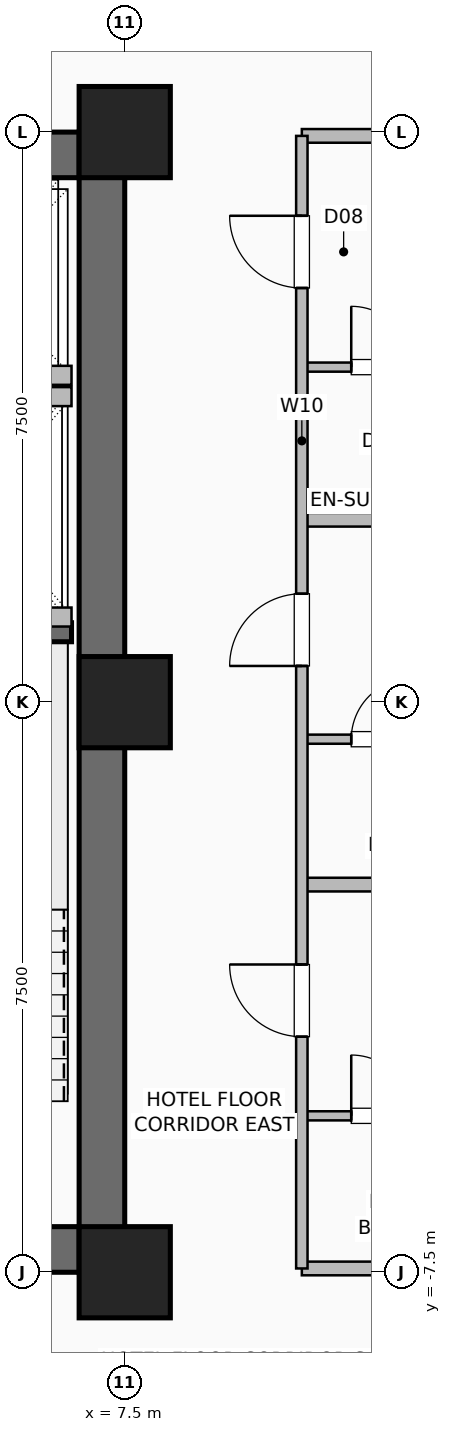
"""IFC4 building model, lengths in metres.
Left out: names, types, materials, properties, quantities, classifications, styles, units other than length and angle.
Written with IfcOpenShell. Run it as: python <this file> out.ifc"""

import sys

from ifc_helpers import new_model, si_unit, direction, frame, frame_2d, origin, origin_2d, place, context, subcontext, project, spatial, rectangle, hollow_rectangle, extrude, element, fill, save


model = new_model("IFC4")
c1 = context("Model", 3, precision=1e-05, world=origin(), true_north=direction((0.0, 1.0)))
c2 = subcontext(c1, "Body", "Model", "MODEL_VIEW")
j1 = project(units=[si_unit("LENGTHUNIT", "METRE"), si_unit("PLANEANGLEUNIT", "RADIAN")], contexts=[c1])
p1 = place(None, origin())
s1 = spatial("IfcSite", under=j1, at=p1, CompositionType="ELEMENT")
p2 = place(p1, origin())
s2 = spatial("IfcBuilding", under=s1, at=p2, CompositionType="ELEMENT")
p3 = place(p2, frame((0.0, 0.0, 69.0)))
s3 = spatial("IfcBuildingStorey", under=s2, at=p3, CompositionType="ELEMENT", Elevation=69.0)
for number, where, z_axis, x_axis in (
    (1, (7.5, -7.5, 0.0), (0.0, 0.0, 1.0), (1.0, 0.0, 0.0)),
    (2, (7.5, 0.0, 0.0), (0.0, 0.0, 1.0), (1.0, 0.0, 0.0)),
    (3, (7.5, 7.5, 0.0), (0.0, 0.0, 1.0), (1.0, 0.0, 0.0)),
):
    element("IfcColumn", number, at=place(p3, frame(where, z_axis=z_axis, x_axis=x_axis)), inside=s3, PredefinedType="COLUMN", context=c2, shape_type="SweptSolid", body=[
        extrude(hollow_rectangle(XDim=1.2, YDim=1.2, WallThickness=0.055, at=origin_2d()), origin(), (0.0, 0.0, 1.0), 3.5),
    ])
p4 = place(p3, frame((-7.5, -7.2, 0.0), z_axis=(0.0, 0.0, 1.0), x_axis=(1.0, 0.0, 0.0)))
e4 = element("IfcWall", 4, at=p4, inside=s3, PredefinedType="SHEAR", context=c2, shape_type="SweptSolid", body=[
    extrude(rectangle(XDim=15.0, YDim=0.6, at=frame_2d((7.5, 0.0))), origin(), (0.0, 0.0, 1.0), 3.25),
])
p5 = place(p4, frame((1.55, 0.0, 0.0)))
e5 = element("IfcOpeningElement", 5, at=p5, cuts=e4, PredefinedType="OPENING", context=c2, shape_type="SweptSolid", body=[
    extrude(rectangle(XDim=1.05, YDim=2.08, at=frame_2d((0.525, 1.04))), frame((0.0, 0.31, 0.0), z_axis=(0.0, -1.0, 0.0), x_axis=(1.0, 0.0, 0.0)), (0.0, 0.0, 1.0), 0.62),
])
p6 = place(p4, frame((12.4, 0.0, 0.0)))
e6 = element("IfcOpeningElement", 6, at=p6, cuts=e4, PredefinedType="OPENING", context=c2, shape_type="SweptSolid", body=[
    extrude(rectangle(XDim=1.05, YDim=2.08, at=frame_2d((0.525, 1.04))), frame((0.0, 0.31, 0.0), z_axis=(0.0, -1.0, 0.0), x_axis=(1.0, 0.0, 0.0)), (0.0, 0.0, 1.0), 0.62),
])
p7 = place(p4, frame((4.64, 0.0, 0.0)))
e7 = element("IfcOpeningElement", 7, at=p7, cuts=e4, PredefinedType="OPENING", context=c2, shape_type="SweptSolid", body=[
    extrude(rectangle(XDim=1.1, YDim=2.2, at=frame_2d((0.55, 1.1))), frame((0.0, 0.31, 0.0), z_axis=(0.0, -1.0, 0.0), x_axis=(1.0, 0.0, 0.0)), (0.0, 0.0, 1.0), 0.62),
])
p8 = place(p4, frame((6.52, 0.0, 0.0)))
e8 = element("IfcOpeningElement", 8, at=p8, cuts=e4, PredefinedType="OPENING", context=c2, shape_type="SweptSolid", body=[
    extrude(rectangle(XDim=1.1, YDim=2.2, at=frame_2d((0.55, 1.1))), frame((0.0, 0.31, 0.0), z_axis=(0.0, -1.0, 0.0), x_axis=(1.0, 0.0, 0.0)), (0.0, 0.0, 1.0), 0.62),
])
p9 = place(p4, frame((8.4, 0.0, 0.0)))
e9 = element("IfcOpeningElement", 9, at=p9, cuts=e4, PredefinedType="OPENING", context=c2, shape_type="SweptSolid", body=[
    extrude(rectangle(XDim=1.1, YDim=2.2, at=frame_2d((0.55, 1.1))), frame((0.0, 0.31, 0.0), z_axis=(0.0, -1.0, 0.0), x_axis=(1.0, 0.0, 0.0)), (0.0, 0.0, 1.0), 0.62),
])
for number, where, z_axis, x_axis in (
    (10, (-7.5, 7.2, 0.0), (0.0, 0.0, 1.0), (1.0, 0.0, 0.0)),
    (11, (7.2, -7.5, 0.0), (0.0, 0.0, 1.0), (0.0, 1.0, 0.0)),
):
    element("IfcWall", number, at=place(p3, frame(where, z_axis=z_axis, x_axis=x_axis)), inside=s3, PredefinedType="SHEAR", context=c2, shape_type="SweptSolid", body=[
        extrude(rectangle(XDim=15.0, YDim=0.6, at=frame_2d((7.5, 0.0))), origin(), (0.0, 0.0, 1.0), 3.25),
    ])
p10 = place(p3, frame((3.47, 0.92, 0.0), z_axis=(0.0, 0.0, 1.0), x_axis=(1.0, 0.0, 0.0)))
e12 = element("IfcWall", 12, at=p10, inside=s3, PredefinedType="SHEAR", context=c2, shape_type="SweptSolid", body=[
    extrude(rectangle(XDim=3.33, YDim=0.25, at=frame_2d((1.665, 0.0))), origin(), (0.0, 0.0, 1.0), 3.25),
])
p11 = place(p3, frame((4.38, 4.3, 0.0), z_axis=(0.0, 0.0, 1.0), x_axis=(1.0, 0.0, 0.0)))
e13 = element("IfcWall", 13, at=p11, inside=s3, PredefinedType="SHEAR", context=c2, shape_type="SweptSolid", body=[
    extrude(rectangle(XDim=2.42, YDim=0.25, at=frame_2d((1.21, 0.0))), origin(), (0.0, 0.0, 1.0), 3.25),
])
for number, where, z_axis, x_axis in (
    (14, (4.28, 1.12, 0.0), (0.0, 0.0, 1.0), (1.0, 0.0, 0.0)),
    (15, (4.28, 4.02, 0.0), (0.0, 0.0, 1.0), (1.0, 0.0, 0.0)),
):
    element("IfcWall", number, at=place(p3, frame(where, z_axis=z_axis, x_axis=x_axis)), inside=s3, PredefinedType="SHEAR", context=c2, shape_type="SweptSolid", body=[
        extrude(rectangle(XDim=2.52, YDim=0.25, at=frame_2d((1.26, 0.0))), origin(), (0.0, 0.0, 1.0), 3.25),
    ])
p12 = place(p3, frame((9.83, -5.442, 0.0), z_axis=(0.0, 0.0, 1.0), x_axis=(1.0, 0.0, 0.0)))
e16 = element("IfcWall", 16, at=p12, inside=s3, PredefinedType="PLUMBINGWALL", context=c2, shape_type="SweptSolid", body=[
    extrude(rectangle(XDim=2.25, YDim=0.12, at=frame_2d((1.125, 0.0))), origin(), (0.0, 0.0, 1.0), 3.25),
])
p13 = place(p12, frame((0.65, 0.0, 0.0)))
e17 = element("IfcOpeningElement", 17, at=p13, cuts=e16, PredefinedType="OPENING", context=c2, shape_type="SweptSolid", body=[
    extrude(rectangle(XDim=0.8, YDim=2.05, at=frame_2d((0.4, 1.025))), frame((0.0, 0.07, 0.0), z_axis=(0.0, -1.0, 0.0), x_axis=(1.0, 0.0, 0.0)), (0.0, 0.0, 1.0), 0.14),
])
p14 = place(p3, frame((9.83, -0.487, 0.0), z_axis=(0.0, 0.0, 1.0), x_axis=(1.0, 0.0, 0.0)))
e18 = element("IfcWall", 18, at=p14, inside=s3, PredefinedType="PLUMBINGWALL", context=c2, shape_type="SweptSolid", body=[
    extrude(rectangle(XDim=2.25, YDim=0.12, at=frame_2d((1.125, 0.0))), origin(), (0.0, 0.0, 1.0), 3.25),
])
p15 = place(p14, frame((0.65, 0.0, 0.0)))
e19 = element("IfcOpeningElement", 19, at=p15, cuts=e18, PredefinedType="OPENING", context=c2, shape_type="SweptSolid", body=[
    extrude(rectangle(XDim=0.8, YDim=2.05, at=frame_2d((0.4, 1.025))), frame((0.0, 0.07, 0.0), z_axis=(0.0, -1.0, 0.0), x_axis=(1.0, 0.0, 0.0)), (0.0, 0.0, 1.0), 0.14),
])
p16 = place(p3, frame((9.83, 4.408, 0.0), z_axis=(0.0, 0.0, 1.0), x_axis=(1.0, 0.0, 0.0)))
e20 = element("IfcWall", 20, at=p16, inside=s3, PredefinedType="PLUMBINGWALL", context=c2, shape_type="SweptSolid", body=[
    extrude(rectangle(XDim=2.25, YDim=0.12, at=frame_2d((1.125, 0.0))), origin(), (0.0, 0.0, 1.0), 3.25),
])
p17 = place(p16, frame((0.65, 0.0, 0.0)))
e21 = element("IfcOpeningElement", 21, at=p17, cuts=e20, PredefinedType="OPENING", context=c2, shape_type="SweptSolid", body=[
    extrude(rectangle(XDim=0.8, YDim=2.05, at=frame_2d((0.4, 1.025))), frame((0.0, 0.07, 0.0), z_axis=(0.0, -1.0, 0.0), x_axis=(1.0, 0.0, 0.0)), (0.0, 0.0, 1.0), 0.14),
])
for number, where, z_axis, x_axis in (
    (22, (9.83, -7.45, 0.0), (0.0, 0.0, 1.0), (1.0, 0.0, 0.0)),
    (23, (9.83, -2.4, 0.0), (0.0, 0.0, 1.0), (1.0, 0.0, 0.0)),
    (24, (9.83, 2.4, 0.0), (0.0, 0.0, 1.0), (1.0, 0.0, 0.0)),
    (25, (9.83, 7.45, 0.0), (0.0, 0.0, 1.0), (1.0, 0.0, 0.0)),
):
    element("IfcWall", number, at=place(p3, frame(where, z_axis=z_axis, x_axis=x_axis)), inside=s3, PredefinedType="PARTITIONING", context=c2, shape_type="SweptSolid", body=[
        extrude(rectangle(XDim=13.99, YDim=0.18, at=frame_2d((6.995, 0.0))), origin(), (0.0, 0.0, 1.0), 3.25),
    ])
p18 = place(p3, frame((9.83, -7.45, 0.0), z_axis=(0.0, 0.0, 1.0), x_axis=(0.0, 1.0, 0.0)))
e26 = element("IfcWall", 26, at=p18, inside=s3, PredefinedType="PARTITIONING", context=c2, shape_type="SweptSolid", body=[
    extrude(rectangle(XDim=14.9, YDim=0.15, at=frame_2d((7.45, 0.0))), origin(), (0.0, 0.0, 1.0), 3.25),
])
p19 = place(p18, frame((3.049, 0.0, 0.0)))
e27 = element("IfcOpeningElement", 27, at=p19, cuts=e26, PredefinedType="OPENING", context=c2, shape_type="SweptSolid", body=[
    extrude(rectangle(XDim=0.95, YDim=2.08, at=frame_2d((0.475, 1.04))), frame((0.0, 0.085, 0.0), z_axis=(0.0, -1.0, 0.0), x_axis=(1.0, 0.0, 0.0)), (0.0, 0.0, 1.0), 0.17),
])
p20 = place(p18, frame((7.927, 0.0, 0.0)))
e28 = element("IfcOpeningElement", 28, at=p20, cuts=e26, PredefinedType="OPENING", context=c2, shape_type="SweptSolid", body=[
    extrude(rectangle(XDim=0.95, YDim=2.08, at=frame_2d((0.475, 1.04))), frame((0.0, 0.085, 0.0), z_axis=(0.0, -1.0, 0.0), x_axis=(1.0, 0.0, 0.0)), (0.0, 0.0, 1.0), 0.17),
])
p21 = place(p18, frame((12.899, 0.0, 0.0)))
e29 = element("IfcOpeningElement", 29, at=p21, cuts=e26, PredefinedType="OPENING", context=c2, shape_type="SweptSolid", body=[
    extrude(rectangle(XDim=0.95, YDim=2.08, at=frame_2d((0.475, 1.04))), frame((0.0, 0.085, 0.0), z_axis=(0.0, -1.0, 0.0), x_axis=(1.0, 0.0, 0.0)), (0.0, 0.0, 1.0), 0.17),
])
p22 = place(p13, origin())
e30 = element("IfcDoor", 30, at=p22, inside=s3, OperationType="SINGLE_SWING_LEFT", PredefinedType="DOOR", context=c2, shape_type="SweptSolid", body=[
    extrude(rectangle(XDim=0.8, YDim=2.05, at=frame_2d((0.4, 1.025))), frame((0.0, 0.025, 0.0), z_axis=(0.0, -1.0, 0.0), x_axis=(1.0, 0.0, 0.0)), (0.0, 0.0, 1.0), 0.05),
])
fill(e17, e30)
p23 = place(p15, origin())
e31 = element("IfcDoor", 31, at=p23, inside=s3, OperationType="SINGLE_SWING_RIGHT", PredefinedType="DOOR", context=c2, shape_type="SweptSolid", body=[
    extrude(rectangle(XDim=0.8, YDim=2.05, at=frame_2d((0.4, 1.025))), frame((0.0, 0.025, 0.0), z_axis=(0.0, -1.0, 0.0), x_axis=(1.0, 0.0, 0.0)), (0.0, 0.0, 1.0), 0.05),
])
fill(e19, e31)
p24 = place(p17, origin())
e32 = element("IfcDoor", 32, at=p24, inside=s3, OperationType="SINGLE_SWING_LEFT", PredefinedType="DOOR", context=c2, shape_type="SweptSolid", body=[
    extrude(rectangle(XDim=0.8, YDim=2.05, at=frame_2d((0.4, 1.025))), frame((0.0, 0.025, 0.0), z_axis=(0.0, -1.0, 0.0), x_axis=(1.0, 0.0, 0.0)), (0.0, 0.0, 1.0), 0.05),
])
fill(e21, e32)
p25 = place(p19, origin())
e33 = element("IfcDoor", 33, at=p25, inside=s3, OperationType="SINGLE_SWING_RIGHT", PredefinedType="DOOR", context=c2, shape_type="SweptSolid", body=[
    extrude(rectangle(XDim=0.95, YDim=2.08, at=frame_2d((0.475, 1.04))), frame((0.0, 0.025, 0.0), z_axis=(0.0, -1.0, 0.0), x_axis=(1.0, 0.0, 0.0)), (0.0, 0.0, 1.0), 0.05),
])
fill(e27, e33)
p26 = place(p20, origin())
e34 = element("IfcDoor", 34, at=p26, inside=s3, OperationType="SINGLE_SWING_LEFT", PredefinedType="DOOR", context=c2, shape_type="SweptSolid", body=[
    extrude(rectangle(XDim=0.95, YDim=2.08, at=frame_2d((0.475, 1.04))), frame((0.0, 0.025, 0.0), z_axis=(0.0, -1.0, 0.0), x_axis=(1.0, 0.0, 0.0)), (0.0, 0.0, 1.0), 0.05),
])
fill(e28, e34)
p27 = place(p21, origin())
e35 = element("IfcDoor", 35, at=p27, inside=s3, OperationType="SINGLE_SWING_RIGHT", PredefinedType="DOOR", context=c2, shape_type="SweptSolid", body=[
    extrude(rectangle(XDim=0.95, YDim=2.08, at=frame_2d((0.475, 1.04))), frame((0.0, 0.025, 0.0), z_axis=(0.0, -1.0, 0.0), x_axis=(1.0, 0.0, 0.0)), (0.0, 0.0, 1.0), 0.05),
])
fill(e29, e35)
save(model, sys.argv[1])
